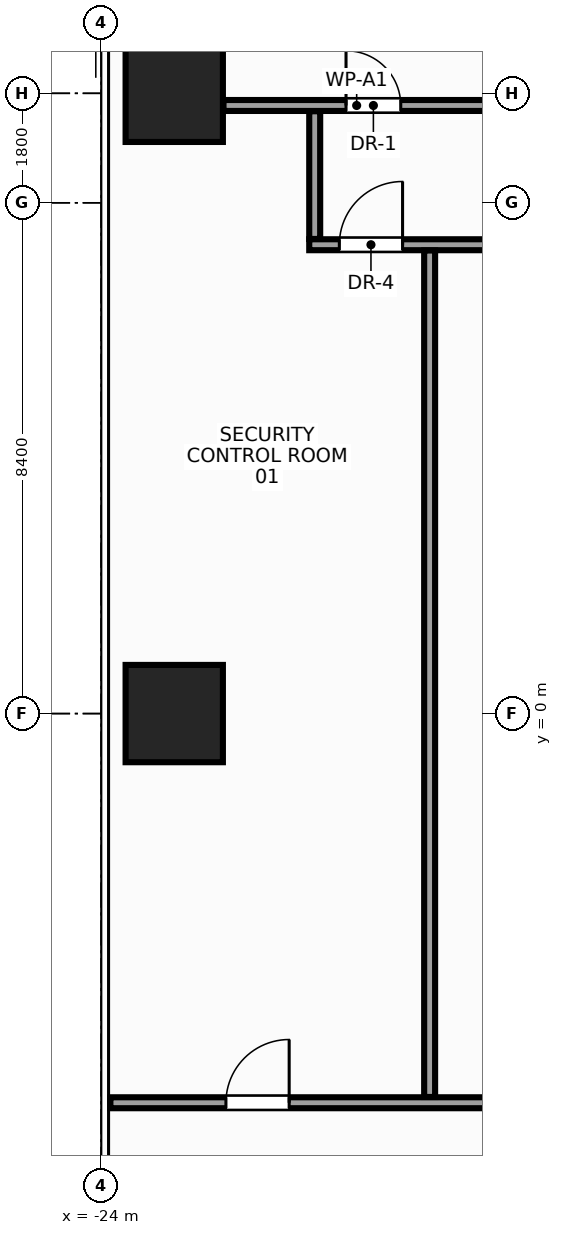
"""IFC4 building model, lengths in metres.
Left out: names, types, materials, properties, quantities, classifications, styles, units other than length and angle.
Written with IfcOpenShell. Run it as: python <this file> out.ifc"""

import sys

from ifc_helpers import new_model, si_unit, direction, frame, frame_2d, origin, origin_2d, place, context, subcontext, project, spatial, rectangle, extrude, source, transform, mapped, element, fill, save


model = new_model("IFC4")
c1 = context("Model", 3, precision=1e-05, world=origin(), true_north=direction((0.0, 1.0)))
c2 = subcontext(c1, "Body", "Model", "MODEL_VIEW")
j1 = project(units=[si_unit("LENGTHUNIT", "METRE"), si_unit("PLANEANGLEUNIT", "RADIAN")], contexts=[c1])
p1 = place(None, origin())
s1 = spatial("IfcSite", under=j1, at=p1, CompositionType="ELEMENT")
p2 = place(p1, origin())
s2 = spatial("IfcBuilding", under=s1, at=p2, CompositionType="ELEMENT")
p3 = place(p2, frame((0.0, 0.0, 167.6)))
s3 = spatial("IfcBuildingStorey", under=s2, at=p3, CompositionType="ELEMENT", Elevation=167.6)
m1 = source(origin(), c2, "Body", "SweptSolid", [
    extrude(rectangle(XDim=1.6, YDim=1.6, at=origin_2d()), origin(), (0.0, 0.0, 1.0), 3.6),
])
for number, where, z_axis, x_axis in (
    (1, (-22.8, 0.0, 0.0), (0.0, 0.0, 1.0), (1.0, 0.0, 0.0)),
    (2, (-22.8, 10.2, 0.0), (0.0, 0.0, 1.0), (1.0, 0.0, 0.0)),
):
    element("IfcColumn", number, at=place(p3, frame(where, z_axis=z_axis, x_axis=x_axis)), inside=s3, PredefinedType="COLUMN", context=c2, shape_type="MappedRepresentation", body=[
        mapped(m1, transform((0.0, 0.0, 0.0), x_axis=(1.0, 0.0, 0.0), y_axis=(0.0, 1.0, 0.0), z_axis=(0.0, 0.0, 1.0), scale=1.0)),
    ])
m2 = source(origin(), c2, "Body", "SweptSolid", [
    extrude(rectangle(XDim=4.38, YDim=0.18, at=frame_2d((2.19, 0.0))), origin(), (0.0, 0.0, 1.0), 2.915),
])
p4 = place(p3, frame((-21.99, 10.0, 0.0), z_axis=(0.0, 0.0, 1.0), x_axis=(1.0, 0.0, 0.0)))
e3 = element("IfcWall", 3, at=p4, inside=s3, PredefinedType="PARTITIONING", context=c2, shape_type="MappedRepresentation", body=[
    mapped(m2, transform((0.0, 0.0, 0.0), x_axis=(1.0, 0.0, 0.0), y_axis=(0.0, 1.0, 0.0), z_axis=(0.0, 0.0, 1.0), scale=1.0)),
])
p5 = place(p4, frame((2.015, 0.0, 0.0)))
e4 = element("IfcOpeningElement", 4, at=p5, cuts=e3, PredefinedType="OPENING", context=c2, shape_type="SweptSolid", body=[
    extrude(rectangle(XDim=0.9, YDim=2.15, at=frame_2d((0.45, 1.075))), frame((0.0, 0.102, 0.0), z_axis=(0.0, -1.0, 0.0), x_axis=(1.0, 0.0, 0.0)), (0.0, 0.0, 1.0), 0.204),
])
m3 = source(origin(), c2, "Body", "SweptSolid", [
    extrude(rectangle(XDim=31.6, YDim=0.18, at=frame_2d((15.8, 0.0))), origin(), (0.0, 0.0, 1.0), 2.765),
])
p6 = place(p3, frame((-20.58, 7.71, 0.0), z_axis=(0.0, 0.0, 1.0), x_axis=(1.0, 0.0, 0.0)))
e5 = element("IfcWall", 5, at=p6, inside=s3, PredefinedType="PARTITIONING", context=c2, shape_type="MappedRepresentation", body=[
    mapped(m3, transform((0.0, 0.0, 0.0), x_axis=(1.0, 0.0, 0.0), y_axis=(0.0, 1.0, 0.0), z_axis=(0.0, 0.0, 1.0), scale=1.0)),
])
p7 = place(p6, frame((0.495, 0.0, 0.0)))
e6 = element("IfcOpeningElement", 6, at=p7, cuts=e5, PredefinedType="OPENING", context=c2, shape_type="SweptSolid", body=[
    extrude(rectangle(XDim=1.04, YDim=2.2, at=frame_2d((0.52, 1.1))), frame((0.0, 0.102, 0.0), z_axis=(0.0, -1.0, 0.0), x_axis=(1.0, 0.0, 0.0)), (0.0, 0.0, 1.0), 0.204),
])
p8 = place(p6, frame((5.16, 0.0, 0.0)))
e7 = element("IfcOpeningElement", 7, at=p8, cuts=e5, PredefinedType="OPENING", context=c2, shape_type="SweptSolid", body=[
    extrude(rectangle(XDim=1.04, YDim=2.2, at=frame_2d((0.52, 1.1))), frame((0.0, 0.102, 0.0), z_axis=(0.0, -1.0, 0.0), x_axis=(1.0, 0.0, 0.0)), (0.0, 0.0, 1.0), 0.204),
])
p9 = place(p6, frame((19.86, 0.0, 0.0)))
e8 = element("IfcOpeningElement", 8, at=p9, cuts=e5, PredefinedType="OPENING", context=c2, shape_type="SweptSolid", body=[
    extrude(rectangle(XDim=1.04, YDim=2.2, at=frame_2d((0.52, 1.1))), frame((0.0, 0.102, 0.0), z_axis=(0.0, -1.0, 0.0), x_axis=(1.0, 0.0, 0.0)), (0.0, 0.0, 1.0), 0.204),
])
m4 = source(origin(), c2, "Body", "SweptSolid", [
    extrude(rectangle(XDim=2.1, YDim=0.18, at=frame_2d((1.05, 0.0))), origin(), (0.0, 0.0, 1.0), 3.38),
])
p10 = place(p3, frame((-20.49, 7.805, 0.0), z_axis=(0.0, 0.0, 1.0), x_axis=(0.0, 1.0, 0.0)))
e9 = element("IfcWall", 9, at=p10, inside=s3, PredefinedType="PARTITIONING", context=c2, shape_type="MappedRepresentation", body=[
    mapped(m4, transform((0.0, 0.0, 0.0), x_axis=(1.0, 0.0, 0.0), y_axis=(0.0, 1.0, 0.0), z_axis=(0.0, 0.0, 1.0), scale=1.0)),
])
m5 = source(origin(), c2, "Body", "SweptSolid", [
    extrude(rectangle(XDim=34.865, YDim=0.18, at=frame_2d((17.433, 0.0))), origin(), (0.0, 0.0, 1.0), 2.765),
])
p11 = place(p3, frame((-23.85, -6.4, 0.0), z_axis=(0.0, 0.0, 1.0), x_axis=(1.0, 0.0, 0.0)))
e10 = element("IfcWall", 10, at=p11, inside=s3, PredefinedType="PARTITIONING", context=c2, shape_type="MappedRepresentation", body=[
    mapped(m5, transform((0.0, 0.0, 0.0), x_axis=(1.0, 0.0, 0.0), y_axis=(0.0, 1.0, 0.0), z_axis=(0.0, 0.0, 1.0), scale=1.0)),
])
p12 = place(p11, frame((1.9, 0.0, 0.0)))
e11 = element("IfcOpeningElement", 11, at=p12, cuts=e10, PredefinedType="OPENING", context=c2, shape_type="SweptSolid", body=[
    extrude(rectangle(XDim=1.04, YDim=2.2, at=frame_2d((0.52, 1.1))), frame((0.0, 0.102, 0.0), z_axis=(0.0, -1.0, 0.0), x_axis=(1.0, 0.0, 0.0)), (0.0, 0.0, 1.0), 0.204),
])
p13 = place(p11, frame((9.33, 0.0, 0.0)))
e12 = element("IfcOpeningElement", 12, at=p13, cuts=e10, PredefinedType="OPENING", context=c2, shape_type="SweptSolid", body=[
    extrude(rectangle(XDim=1.04, YDim=2.2, at=frame_2d((0.52, 1.1))), frame((0.0, 0.102, 0.0), z_axis=(0.0, -1.0, 0.0), x_axis=(1.0, 0.0, 0.0)), (0.0, 0.0, 1.0), 0.204),
])
p14 = place(p11, frame((21.33, 0.0, 0.0)))
e13 = element("IfcOpeningElement", 13, at=p14, cuts=e10, PredefinedType="OPENING", context=c2, shape_type="SweptSolid", body=[
    extrude(rectangle(XDim=1.04, YDim=2.2, at=frame_2d((0.52, 1.1))), frame((0.0, 0.102, 0.0), z_axis=(0.0, -1.0, 0.0), x_axis=(1.0, 0.0, 0.0)), (0.0, 0.0, 1.0), 0.204),
])
m6 = source(origin(), c2, "Body", "SweptSolid", [
    extrude(rectangle(XDim=13.92, YDim=0.18, at=frame_2d((6.96, 0.0))), origin(), (0.0, 0.0, 1.0), 2.915),
])
p15 = place(p3, frame((-18.6, -6.305, 0.0), z_axis=(0.0, 0.0, 1.0), x_axis=(0.0, 1.0, 0.0)))
e14 = element("IfcWall", 14, at=p15, inside=s3, PredefinedType="PARTITIONING", context=c2, shape_type="MappedRepresentation", body=[
    mapped(m6, transform((0.0, 0.0, 0.0), x_axis=(1.0, 0.0, 0.0), y_axis=(0.0, 1.0, 0.0), z_axis=(0.0, 0.0, 1.0), scale=1.0)),
])
m7 = source(origin(), c2, "Body", "SweptSolid", [
    extrude(rectangle(XDim=0.9, YDim=2.15, at=frame_2d((0.45, 1.075))), frame((0.0, 0.025, 0.0), z_axis=(0.0, -1.0, 0.0), x_axis=(1.0, 0.0, 0.0)), (0.0, 0.0, 1.0), 0.05),
])
p16 = place(p5, origin())
e15 = element("IfcDoor", 15, at=p16, inside=s3, OperationType="SINGLE_SWING_LEFT", PredefinedType="DOOR", context=c2, shape_type="MappedRepresentation", body=[
    mapped(m7, transform((0.0, 0.0, 0.0), x_axis=(1.0, 0.0, 0.0), y_axis=(0.0, 1.0, 0.0), z_axis=(0.0, 0.0, 1.0), scale=1.0)),
])
fill(e4, e15)
m8 = source(origin(), c2, "Body", "SweptSolid", [
    extrude(rectangle(XDim=1.04, YDim=2.2, at=frame_2d((0.52, 1.1))), frame((0.0, 0.025, 0.0), z_axis=(0.0, -1.0, 0.0), x_axis=(1.0, 0.0, 0.0)), (0.0, 0.0, 1.0), 0.05),
])
p17 = place(p7, origin())
e16 = element("IfcDoor", 16, at=p17, inside=s3, OperationType="SINGLE_SWING_RIGHT", PredefinedType="DOOR", context=c2, shape_type="MappedRepresentation", body=[
    mapped(m8, transform((0.0, 0.0, 0.0), x_axis=(1.0, 0.0, 0.0), y_axis=(0.0, 1.0, 0.0), z_axis=(0.0, 0.0, 1.0), scale=1.0)),
])
fill(e6, e16)
p18 = place(p12, origin())
e17 = element("IfcDoor", 17, at=p18, inside=s3, OperationType="SINGLE_SWING_RIGHT", PredefinedType="DOOR", context=c2, shape_type="MappedRepresentation", body=[
    mapped(m8, transform((0.0, 0.0, 0.0), x_axis=(1.0, 0.0, 0.0), y_axis=(0.0, 1.0, 0.0), z_axis=(0.0, 0.0, 1.0), scale=1.0)),
])
fill(e11, e17)
save(model, sys.argv[1])
